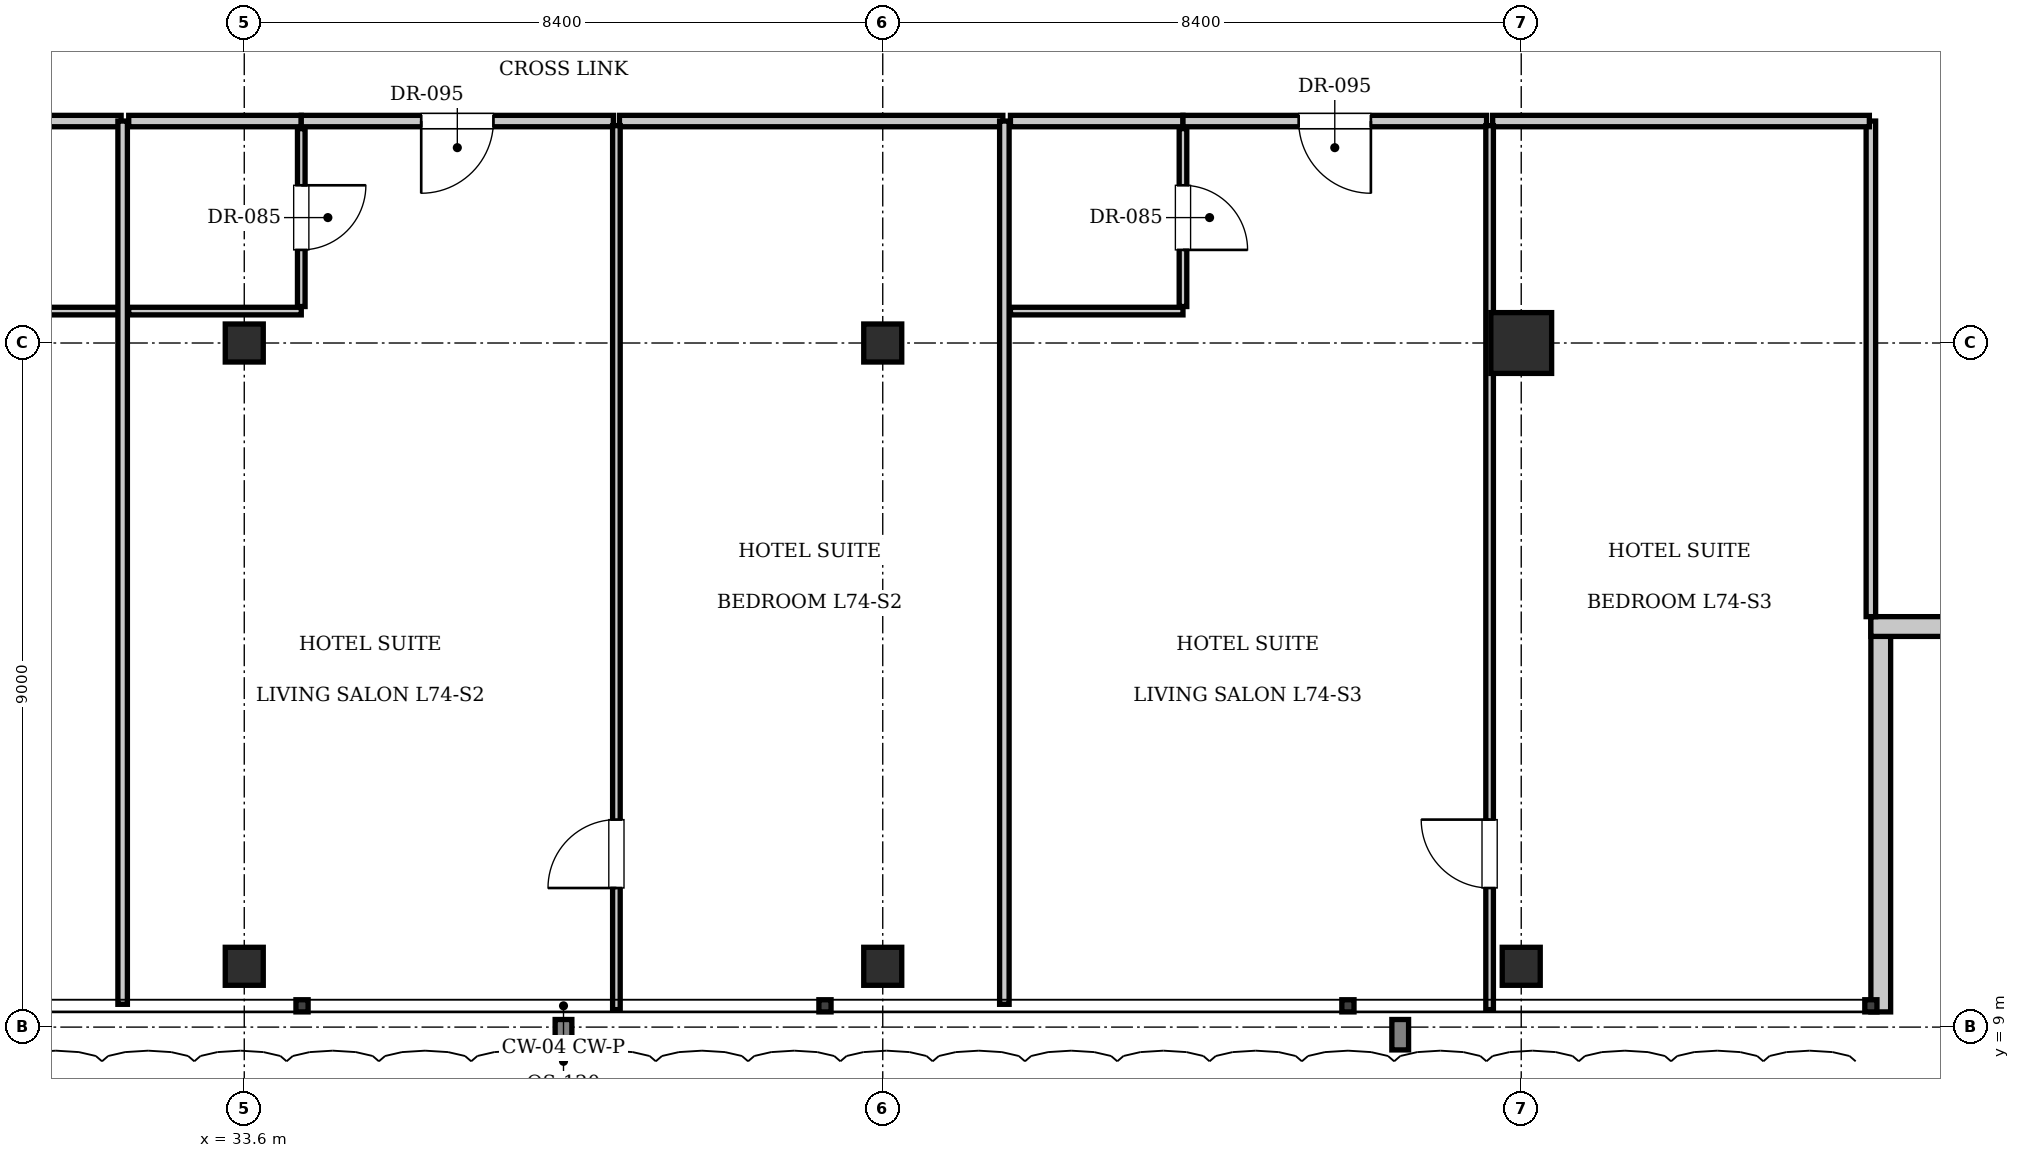
"""IFC4 building model, lengths in metres.
Left out: names, types, materials, properties, quantities, classifications, styles, units other than length and angle.
Written with IfcOpenShell. Run it as: python <this file> out.ifc"""

import sys

from ifc_helpers import new_model, si_unit, direction, frame, frame_2d, origin, origin_2d, place, context, subcontext, project, spatial, rectangle, i_section, extrude, element, fill, save


model = new_model("IFC4")
c1 = context("Model", 3, precision=1e-05, world=origin(), true_north=direction((0.0, 1.0)))
c2 = subcontext(c1, "Body", "Model", "MODEL_VIEW")
j1 = project(units=[si_unit("LENGTHUNIT", "METRE"), si_unit("PLANEANGLEUNIT", "RADIAN")], contexts=[c1])
p1 = place(None, origin())
s1 = spatial("IfcSite", under=j1, at=p1, CompositionType="ELEMENT")
p2 = place(p1, origin())
s2 = spatial("IfcBuilding", under=s1, at=p2, CompositionType="ELEMENT")
p3 = place(p2, frame((0.0, 0.0, 301.0)))
s3 = spatial("IfcBuildingStorey", under=s2, at=p3, CompositionType="ELEMENT", Elevation=301.0)
p4 = place(p3, frame((50.4, 18.0, 0.0), z_axis=(0.0, 0.0, 1.0), x_axis=(1.0, 0.0, 0.0)))
e1 = element("IfcColumn", 1, at=p4, inside=s3, PredefinedType="COLUMN", context=c2, shape_type="SweptSolid", body=[
    extrude(rectangle(XDim=0.8, YDim=0.8, at=origin_2d()), origin(), (0.0, 0.0, 1.0), 3.85),
])
for number, where, z_axis, x_axis in (
    (2, (33.6, 18.0, 0.0), (0.0, 0.0, 1.0), (1.0, 0.0, 0.0)),
    (3, (42.0, 18.0, 0.0), (0.0, 0.0, 1.0), (1.0, 0.0, 0.0)),
    (4, (33.6, 9.8, 0.0), (0.0, 0.0, 1.0), (1.0, 0.0, 0.0)),
    (5, (42.0, 9.8, 0.0), (0.0, 0.0, 1.0), (1.0, 0.0, 0.0)),
    (6, (50.4, 9.8, 0.0), (0.0, 0.0, 1.0), (1.0, 0.0, 0.0)),
):
    element("IfcColumn", number, at=place(p3, frame(where, z_axis=z_axis, x_axis=x_axis)), inside=s3, PredefinedType="COLUMN", context=c2, shape_type="SweptSolid", body=[
        extrude(i_section(OverallWidth=0.5, OverallDepth=0.5, WebThickness=0.022, FlangeThickness=0.032, at=origin_2d()), origin(), (0.0, 0.0, 1.0), 3.85),
    ])
p5 = place(p3, frame((55.13, 14.4, 0.0), z_axis=(0.0, 0.0, 1.0), x_axis=(0.0, -1.0, 0.0)))
e7 = element("IfcWall", 7, at=p5, inside=s3, PredefinedType="SOLIDWALL", context=c2, shape_type="SweptSolid", body=[
    extrude(rectangle(XDim=5.2, YDim=0.26, at=frame_2d((2.6, 0.0))), origin(), (0.0, 0.0, 1.0), 3.61),
])
p6 = place(p3, frame((60.2, 14.27, 0.0), z_axis=(0.0, 0.0, 1.0), x_axis=(-1.0, 0.0, 0.0)))
e8 = element("IfcWall", 8, at=p6, inside=s3, PredefinedType="SOLIDWALL", context=c2, shape_type="SweptSolid", body=[
    extrude(rectangle(XDim=5.2, YDim=0.26, at=frame_2d((2.6, 0.0))), origin(), (0.0, 0.0, 1.0), 3.61),
])
p7 = place(p6, frame((1.6, 0.0, 0.9)))
e9 = element("IfcOpeningElement", 9, at=p7, cuts=e8, PredefinedType="OPENING", context=c2, shape_type="SweptSolid", body=[
    extrude(rectangle(XDim=2.0, YDim=2.2, at=frame_2d((1.0, 1.1))), frame((0.0, 0.14, 0.0), z_axis=(0.0, -1.0, 0.0), x_axis=(1.0, 0.0, 0.0)), (0.0, 0.0, 1.0), 0.28),
])
p8 = place(p3, frame((55.0, 14.4, 0.0), z_axis=(0.0, 0.0, 1.0), x_axis=(0.0, 1.0, 0.0)))
e10 = element("IfcWall", 10, at=p8, inside=s3, PredefinedType="PARTITIONING", context=c2, shape_type="SweptSolid", body=[
    extrude(rectangle(XDim=6.52, YDim=0.125, at=frame_2d((3.26, 0.0))), origin(), (0.0, 0.0, 1.0), 3.61),
])
p9 = place(p3, frame((29.65, 20.92, 0.0), z_axis=(0.0, 0.0, 1.0), x_axis=(1.0, 0.0, 0.0)))
e11 = element("IfcWall", 11, at=p9, inside=s3, PredefinedType="PARTITIONING", context=c2, shape_type="SweptSolid", body=[
    extrude(rectangle(XDim=2.33, YDim=0.15, at=frame_2d((1.165, 0.0))), origin(), (0.0, 0.0, 1.0), 3.61),
])
p10 = place(p3, frame((29.65, 18.42, 0.0), z_axis=(0.0, 0.0, 1.0), x_axis=(1.0, 0.0, 0.0)))
e12 = element("IfcWall", 12, at=p10, inside=s3, PredefinedType="PARTITIONING", context=c2, shape_type="SweptSolid", body=[
    extrude(rectangle(XDim=2.31, YDim=0.1, at=frame_2d((1.155, 0.0))), origin(), (0.0, 0.0, 1.0), 3.61),
])
p11 = place(p3, frame((32.0, 9.3, 0.0), z_axis=(0.0, 0.0, 1.0), x_axis=(0.0, 1.0, 0.0)))
e13 = element("IfcWall", 13, at=p11, inside=s3, PredefinedType="PARTITIONING", context=c2, shape_type="SweptSolid", body=[
    extrude(rectangle(XDim=11.62, YDim=0.125, at=frame_2d((5.81, 0.0))), origin(), (0.0, 0.0, 1.0), 3.61),
])
p12 = place(p3, frame((32.08, 20.92, 0.0), z_axis=(0.0, 0.0, 1.0), x_axis=(1.0, 0.0, 0.0)))
e14 = element("IfcWall", 14, at=p12, inside=s3, PredefinedType="PARTITIONING", context=c2, shape_type="SweptSolid", body=[
    extrude(rectangle(XDim=2.27, YDim=0.15, at=frame_2d((1.135, 0.0))), origin(), (0.0, 0.0, 1.0), 3.61),
])
p13 = place(p3, frame((32.08, 18.42, 0.0), z_axis=(0.0, 0.0, 1.0), x_axis=(1.0, 0.0, 0.0)))
e15 = element("IfcWall", 15, at=p13, inside=s3, PredefinedType="PARTITIONING", context=c2, shape_type="SweptSolid", body=[
    extrude(rectangle(XDim=2.27, YDim=0.1, at=frame_2d((1.135, 0.0))), origin(), (0.0, 0.0, 1.0), 3.61),
])
p14 = place(p3, frame((34.35, 18.48, 0.0), z_axis=(0.0, 0.0, 1.0), x_axis=(0.0, 1.0, 0.0)))
e16 = element("IfcWall", 16, at=p14, inside=s3, PredefinedType="PARTITIONING", context=c2, shape_type="SweptSolid", body=[
    extrude(rectangle(XDim=2.34, YDim=0.1, at=frame_2d((1.17, 0.0))), origin(), (0.0, 0.0, 1.0), 3.61),
])
p15 = place(p14, frame((0.745, 0.0, 0.0)))
e17 = element("IfcOpeningElement", 17, at=p15, cuts=e16, PredefinedType="OPENING", context=c2, shape_type="SweptSolid", body=[
    extrude(rectangle(XDim=0.85, YDim=2.1, at=frame_2d((0.425, 1.05))), frame((0.0, 0.06, 0.0), z_axis=(0.0, -1.0, 0.0), x_axis=(1.0, 0.0, 0.0)), (0.0, 0.0, 1.0), 0.12),
])
p16 = place(p3, frame((34.35, 20.92, 0.0), z_axis=(0.0, 0.0, 1.0), x_axis=(1.0, 0.0, 0.0)))
e18 = element("IfcWall", 18, at=p16, inside=s3, PredefinedType="PARTITIONING", context=c2, shape_type="SweptSolid", body=[
    extrude(rectangle(XDim=4.106, YDim=0.15, at=frame_2d((2.053, 0.0))), origin(), (0.0, 0.0, 1.0), 3.61),
])
p17 = place(p16, frame((1.578, 0.0, 0.0)))
e19 = element("IfcOpeningElement", 19, at=p17, cuts=e18, PredefinedType="OPENING", context=c2, shape_type="SweptSolid", body=[
    extrude(rectangle(XDim=0.95, YDim=2.15, at=frame_2d((0.475, 1.075))), frame((0.0, 0.085, 0.0), z_axis=(0.0, -1.0, 0.0), x_axis=(1.0, 0.0, 0.0)), (0.0, 0.0, 1.0), 0.17),
])
p18 = place(p3, frame((38.536, 20.92, 0.0), z_axis=(0.0, 0.0, 1.0), x_axis=(1.0, 0.0, 0.0)))
e20 = element("IfcWall", 20, at=p18, inside=s3, PredefinedType="PARTITIONING", context=c2, shape_type="SweptSolid", body=[
    extrude(rectangle(XDim=5.044, YDim=0.15, at=frame_2d((2.522, 0.0))), origin(), (0.0, 0.0, 1.0), 3.61),
])
p19 = place(p3, frame((38.496, 9.23, 0.0), z_axis=(0.0, 0.0, 1.0), x_axis=(0.0, 1.0, 0.0)))
e21 = element("IfcWall", 21, at=p19, inside=s3, PredefinedType="PARTITIONING", context=c2, shape_type="SweptSolid", body=[
    extrude(rectangle(XDim=11.63, YDim=0.1, at=frame_2d((5.815, 0.0))), origin(), (0.0, 0.0, 1.0), 3.61),
])
p20 = place(p19, frame((1.6, 0.0, 0.0)))
e22 = element("IfcOpeningElement", 22, at=p20, cuts=e21, PredefinedType="OPENING", context=c2, shape_type="SweptSolid", body=[
    extrude(rectangle(XDim=0.9, YDim=2.1, at=frame_2d((0.45, 1.05))), frame((0.0, 0.06, 0.0), z_axis=(0.0, -1.0, 0.0), x_axis=(1.0, 0.0, 0.0)), (0.0, 0.0, 1.0), 0.12),
])
p21 = place(p3, frame((43.6, 9.3, 0.0), z_axis=(0.0, 0.0, 1.0), x_axis=(0.0, 1.0, 0.0)))
e23 = element("IfcWall", 23, at=p21, inside=s3, PredefinedType="PARTITIONING", context=c2, shape_type="SweptSolid", body=[
    extrude(rectangle(XDim=11.62, YDim=0.125, at=frame_2d((5.81, 0.0))), origin(), (0.0, 0.0, 1.0), 3.61),
])
p22 = place(p3, frame((43.68, 20.92, 0.0), z_axis=(0.0, 0.0, 1.0), x_axis=(1.0, 0.0, 0.0)))
e24 = element("IfcWall", 24, at=p22, inside=s3, PredefinedType="PARTITIONING", context=c2, shape_type="SweptSolid", body=[
    extrude(rectangle(XDim=2.27, YDim=0.15, at=frame_2d((1.135, 0.0))), origin(), (0.0, 0.0, 1.0), 3.61),
])
p23 = place(p3, frame((43.68, 18.42, 0.0), z_axis=(0.0, 0.0, 1.0), x_axis=(1.0, 0.0, 0.0)))
e25 = element("IfcWall", 25, at=p23, inside=s3, PredefinedType="PARTITIONING", context=c2, shape_type="SweptSolid", body=[
    extrude(rectangle(XDim=2.27, YDim=0.1, at=frame_2d((1.135, 0.0))), origin(), (0.0, 0.0, 1.0), 3.61),
])
p24 = place(p3, frame((45.95, 18.48, 0.0), z_axis=(0.0, 0.0, 1.0), x_axis=(0.0, 1.0, 0.0)))
e26 = element("IfcWall", 26, at=p24, inside=s3, PredefinedType="PARTITIONING", context=c2, shape_type="SweptSolid", body=[
    extrude(rectangle(XDim=2.34, YDim=0.1, at=frame_2d((1.17, 0.0))), origin(), (0.0, 0.0, 1.0), 3.61),
])
p25 = place(p24, frame((0.745, 0.0, 0.0)))
e27 = element("IfcOpeningElement", 27, at=p25, cuts=e26, PredefinedType="OPENING", context=c2, shape_type="SweptSolid", body=[
    extrude(rectangle(XDim=0.85, YDim=2.1, at=frame_2d((0.425, 1.05))), frame((0.0, 0.06, 0.0), z_axis=(0.0, -1.0, 0.0), x_axis=(1.0, 0.0, 0.0)), (0.0, 0.0, 1.0), 0.12),
])
p26 = place(p3, frame((45.95, 20.92, 0.0), z_axis=(0.0, 0.0, 1.0), x_axis=(1.0, 0.0, 0.0)))
e28 = element("IfcWall", 28, at=p26, inside=s3, PredefinedType="PARTITIONING", context=c2, shape_type="SweptSolid", body=[
    extrude(rectangle(XDim=3.994, YDim=0.15, at=frame_2d((1.997, 0.0))), origin(), (0.0, 0.0, 1.0), 3.61),
])
p27 = place(p26, frame((1.522, 0.0, 0.0)))
e29 = element("IfcOpeningElement", 29, at=p27, cuts=e28, PredefinedType="OPENING", context=c2, shape_type="SweptSolid", body=[
    extrude(rectangle(XDim=0.95, YDim=2.15, at=frame_2d((0.475, 1.075))), frame((0.0, 0.085, 0.0), z_axis=(0.0, -1.0, 0.0), x_axis=(1.0, 0.0, 0.0)), (0.0, 0.0, 1.0), 0.17),
])
p28 = place(p3, frame((50.024, 20.92, 0.0), z_axis=(0.0, 0.0, 1.0), x_axis=(1.0, 0.0, 0.0)))
e30 = element("IfcWall", 30, at=p28, inside=s3, PredefinedType="PARTITIONING", context=c2, shape_type="SweptSolid", body=[
    extrude(rectangle(XDim=4.956, YDim=0.15, at=frame_2d((2.478, 0.0))), origin(), (0.0, 0.0, 1.0), 3.61),
])
p29 = place(p3, frame((49.984, 9.23, 0.0), z_axis=(0.0, 0.0, 1.0), x_axis=(0.0, 1.0, 0.0)))
e31 = element("IfcWall", 31, at=p29, inside=s3, PredefinedType="PARTITIONING", context=c2, shape_type="SweptSolid", body=[
    extrude(rectangle(XDim=11.63, YDim=0.1, at=frame_2d((5.815, 0.0))), origin(), (0.0, 0.0, 1.0), 3.61),
])
p30 = place(p29, frame((1.6, 0.0, 0.0)))
e32 = element("IfcOpeningElement", 32, at=p30, cuts=e31, PredefinedType="OPENING", context=c2, shape_type="SweptSolid", body=[
    extrude(rectangle(XDim=0.9, YDim=2.1, at=frame_2d((0.45, 1.05))), frame((0.0, 0.06, 0.0), z_axis=(0.0, -1.0, 0.0), x_axis=(1.0, 0.0, 0.0)), (0.0, 0.0, 1.0), 0.12),
])
p31 = place(p15, frame((0.85, 0.0, 0.0), z_axis=(0.0, 0.0, 1.0), x_axis=(-1.0, 0.0, 0.0)))
e33 = element("IfcDoor", 33, at=p31, inside=s3, OperationType="SINGLE_SWING_LEFT", PredefinedType="DOOR", context=c2, shape_type="SweptSolid", body=[
    extrude(rectangle(XDim=0.85, YDim=2.1, at=frame_2d((0.425, 1.05))), frame((0.0, 0.025, 0.0), z_axis=(0.0, -1.0, 0.0), x_axis=(1.0, 0.0, 0.0)), (0.0, 0.0, 1.0), 0.05),
])
fill(e17, e33)
p32 = place(p17, frame((0.95, 0.0, 0.0), z_axis=(0.0, 0.0, 1.0), x_axis=(-1.0, 0.0, 0.0)))
e34 = element("IfcDoor", 34, at=p32, inside=s3, OperationType="SINGLE_SWING_RIGHT", PredefinedType="DOOR", context=c2, shape_type="SweptSolid", body=[
    extrude(rectangle(XDim=0.95, YDim=2.15, at=frame_2d((0.475, 1.075))), frame((0.0, 0.025, 0.0), z_axis=(0.0, -1.0, 0.0), x_axis=(1.0, 0.0, 0.0)), (0.0, 0.0, 1.0), 0.05),
])
fill(e19, e34)
p33 = place(p20, origin())
e35 = element("IfcDoor", 35, at=p33, inside=s3, OperationType="SINGLE_SWING_LEFT", PredefinedType="DOOR", context=c2, shape_type="SweptSolid", body=[
    extrude(rectangle(XDim=0.9, YDim=2.1, at=frame_2d((0.45, 1.05))), frame((0.0, 0.025, 0.0), z_axis=(0.0, -1.0, 0.0), x_axis=(1.0, 0.0, 0.0)), (0.0, 0.0, 1.0), 0.05),
])
fill(e22, e35)
p34 = place(p25, frame((0.85, 0.0, 0.0), z_axis=(0.0, 0.0, 1.0), x_axis=(-1.0, 0.0, 0.0)))
e36 = element("IfcDoor", 36, at=p34, inside=s3, OperationType="SINGLE_SWING_RIGHT", PredefinedType="DOOR", context=c2, shape_type="SweptSolid", body=[
    extrude(rectangle(XDim=0.85, YDim=2.1, at=frame_2d((0.425, 1.05))), frame((0.0, 0.025, 0.0), z_axis=(0.0, -1.0, 0.0), x_axis=(1.0, 0.0, 0.0)), (0.0, 0.0, 1.0), 0.05),
])
fill(e27, e36)
p35 = place(p27, frame((0.95, 0.0, 0.0), z_axis=(0.0, 0.0, 1.0), x_axis=(-1.0, 0.0, 0.0)))
e37 = element("IfcDoor", 37, at=p35, inside=s3, OperationType="SINGLE_SWING_LEFT", PredefinedType="DOOR", context=c2, shape_type="SweptSolid", body=[
    extrude(rectangle(XDim=0.95, YDim=2.15, at=frame_2d((0.475, 1.075))), frame((0.0, 0.025, 0.0), z_axis=(0.0, -1.0, 0.0), x_axis=(1.0, 0.0, 0.0)), (0.0, 0.0, 1.0), 0.05),
])
fill(e29, e37)
p36 = place(p30, origin())
e38 = element("IfcDoor", 38, at=p36, inside=s3, OperationType="SINGLE_SWING_RIGHT", PredefinedType="DOOR", context=c2, shape_type="SweptSolid", body=[
    extrude(rectangle(XDim=0.9, YDim=2.1, at=frame_2d((0.45, 1.05))), frame((0.0, 0.025, 0.0), z_axis=(0.0, -1.0, 0.0), x_axis=(1.0, 0.0, 0.0)), (0.0, 0.0, 1.0), 0.05),
])
fill(e32, e38)
save(model, sys.argv[1])
